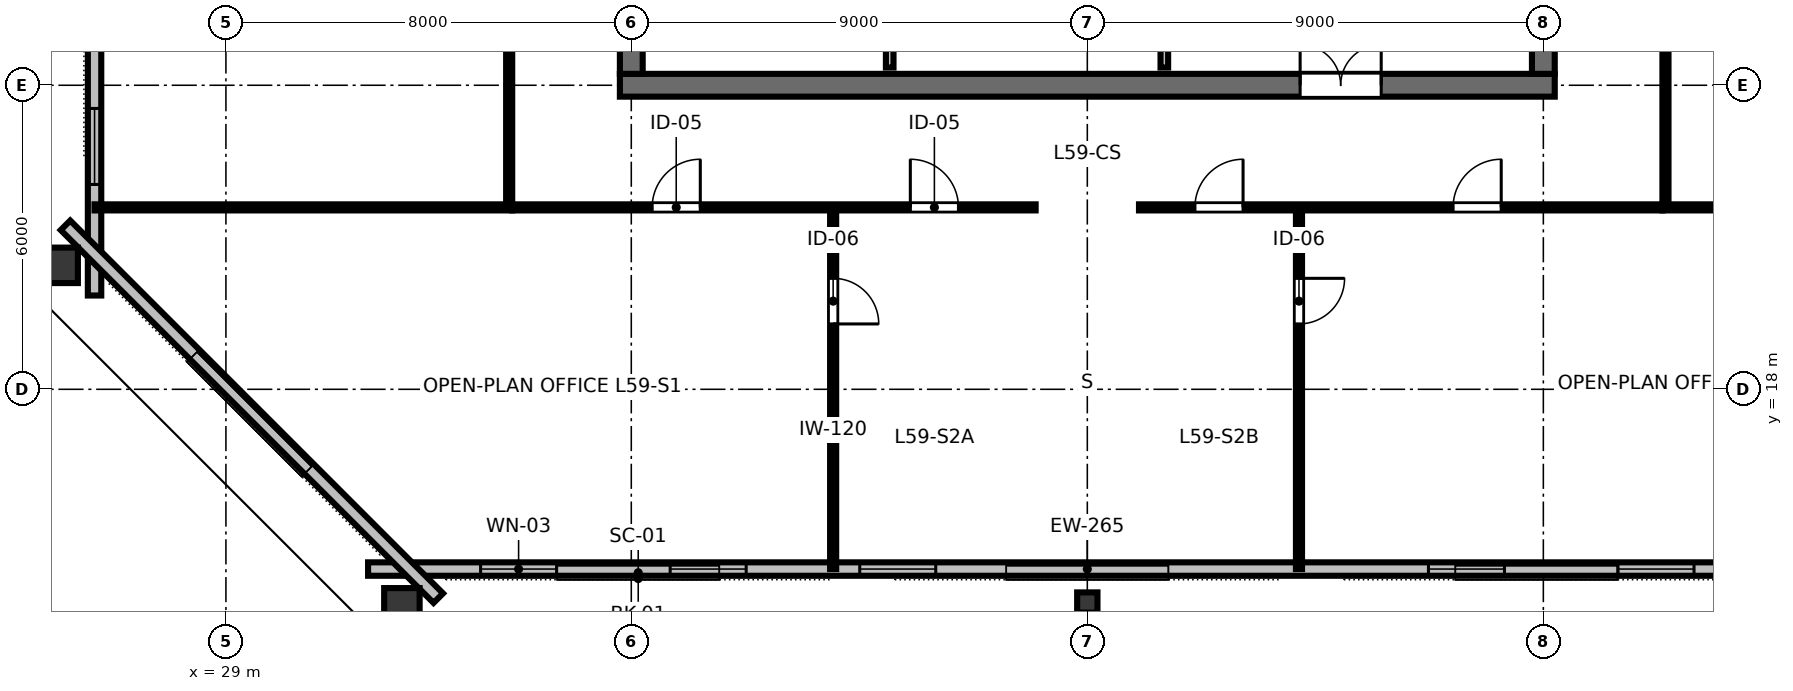
"""IFC4 building model, lengths in metres.
Left out: names, types, materials, properties, quantities, classifications, styles, units other than length and angle.
Written with IfcOpenShell. Run it as: python <this file> out.ifc"""

import sys

from ifc_helpers import new_model, si_unit, direction, frame, frame_2d, origin, origin_2d, place, context, subcontext, project, spatial, rectangle, hollow_rectangle, i_section, extrude, element, fill, save


model = new_model("IFC4")
c1 = context("Model", 3, precision=1e-05, world=origin(), true_north=direction((0.0, 1.0)))
c2 = subcontext(c1, "Body", "Model", "MODEL_VIEW")
j1 = project(units=[si_unit("LENGTHUNIT", "METRE"), si_unit("PLANEANGLEUNIT", "RADIAN")], contexts=[c1])
p1 = place(None, origin())
s1 = spatial("IfcSite", under=j1, at=p1, CompositionType="ELEMENT")
p2 = place(p1, origin())
s2 = spatial("IfcBuilding", under=s1, at=p2, CompositionType="ELEMENT")
p3 = place(p2, frame((0.0, 0.0, 223.8)))
s3 = spatial("IfcBuildingStorey", under=s2, at=p3, CompositionType="ELEMENT", Elevation=223.8)
p4 = place(p3, frame((36.775, 24.0, 0.0), z_axis=(0.0, 0.0, 1.0), x_axis=(1.0, 0.0, 0.0)))
e1 = element("IfcWall", 1, at=p4, inside=s3, PredefinedType="SHEAR", context=c2, shape_type="SweptSolid", body=[
    extrude(rectangle(XDim=18.45, YDim=0.45, at=frame_2d((9.225, 0.0))), origin(), (0.0, 0.0, 1.0), 3.36),
])
p5 = place(p4, frame((13.425, 0.0, 0.0)))
e2 = element("IfcOpeningElement", 2, at=p5, cuts=e1, PredefinedType="OPENING", context=c2, shape_type="SweptSolid", body=[
    extrude(rectangle(XDim=1.6, YDim=2.15, at=frame_2d((0.8, 1.075))), frame((0.0, 0.235, 0.0), z_axis=(0.0, -1.0, 0.0), x_axis=(1.0, 0.0, 0.0)), (0.0, 0.0, 1.0), 0.47),
])
p6 = place(p3, frame((37.0, 24.225, 0.0), z_axis=(0.0, 0.0, 1.0), x_axis=(0.0, 1.0, 0.0)))
e3 = element("IfcWall", 3, at=p6, inside=s3, PredefinedType="SHEAR", context=c2, shape_type="SweptSolid", body=[
    extrude(rectangle(XDim=15.55, YDim=0.45, at=frame_2d((7.775, 0.0))), origin(), (0.0, 0.0, 1.0), 3.36),
])
p7 = place(p6, frame((5.3, 0.0, 0.0)))
e4 = element("IfcOpeningElement", 4, at=p7, cuts=e3, PredefinedType="OPENING", context=c2, shape_type="SweptSolid", body=[
    extrude(rectangle(XDim=1.15, YDim=2.15, at=frame_2d((0.575, 1.075))), frame((0.0, 0.235, 0.0), z_axis=(0.0, -1.0, 0.0), x_axis=(1.0, 0.0, 0.0)), (0.0, 0.0, 1.0), 0.47),
])
p8 = place(p3, frame((55.0, 24.225, 0.0), z_axis=(0.0, 0.0, 1.0), x_axis=(0.0, 1.0, 0.0)))
e5 = element("IfcWall", 5, at=p8, inside=s3, PredefinedType="SHEAR", context=c2, shape_type="SweptSolid", body=[
    extrude(rectangle(XDim=15.55, YDim=0.45, at=frame_2d((7.775, 0.0))), origin(), (0.0, 0.0, 1.0), 3.36),
])
p9 = place(p8, frame((5.3, 0.0, 0.0)))
e6 = element("IfcOpeningElement", 6, at=p9, cuts=e5, PredefinedType="OPENING", context=c2, shape_type="SweptSolid", body=[
    extrude(rectangle(XDim=1.15, YDim=2.15, at=frame_2d((0.575, 1.075))), frame((0.0, 0.235, 0.0), z_axis=(0.0, -1.0, 0.0), x_axis=(1.0, 0.0, 0.0)), (0.0, 0.0, 1.0), 0.47),
])
p10 = place(p3, frame((32.473, 13.652, 0.0), z_axis=(0.0, 0.0, 1.0), x_axis=(1.0, 0.0, 0.0)))
e7 = element("IfcColumn", 7, at=p10, inside=s3, PredefinedType="COLUMN", context=c2, shape_type="SweptSolid", body=[
    extrude(hollow_rectangle(XDim=0.7, YDim=0.85, WallThickness=0.04, at=origin_2d()), origin(), (0.0, 0.0, 1.0), 3.373),
])
p11 = place(p3, frame((46.0, 13.793, 0.0), z_axis=(0.0, 0.0, 1.0), x_axis=(1.0, 0.0, 0.0)))
e8 = element("IfcColumn", 8, at=p11, inside=s3, PredefinedType="COLUMN", context=c2, shape_type="SweptSolid", body=[
    extrude(i_section(OverallWidth=0.401, OverallDepth=0.399, WebThickness=0.025, FlangeThickness=0.04, FilletRadius=0.025, at=origin_2d()), origin(), (0.0, 0.0, 1.0), 3.373),
])
p12 = place(p3, frame((25.653, 20.446, 0.0), z_axis=(0.0, 0.0, 1.0), x_axis=(0.0, 1.0, 0.0)))
e9 = element("IfcColumn", 9, at=p12, inside=s3, PredefinedType="COLUMN", context=c2, shape_type="SweptSolid", body=[
    extrude(hollow_rectangle(XDim=0.7, YDim=0.85, WallThickness=0.04, at=origin_2d()), origin(), (0.0, 0.0, 1.0), 3.373),
])
p13 = place(p3, frame((31.805, 14.453, 0.0), z_axis=(0.0, 0.0, 1.0), x_axis=(1.0, 0.0, 0.0)))
e10 = element("IfcWall", 10, at=p13, inside=s3, PredefinedType="STANDARD", context=c2, shape_type="SweptSolid", body=[
    extrude(rectangle(XDim=28.389, YDim=0.265, at=frame_2d((14.195, 0.0))), origin(), (0.0, 0.0, 1.0), 3.375),
])
p14 = place(p13, frame((2.221, 0.0, 0.85)))
e11 = element("IfcOpeningElement", 11, at=p14, cuts=e10, PredefinedType="OPENING", context=c2, shape_type="SweptSolid", body=[
    extrude(rectangle(XDim=1.5, YDim=1.85, at=frame_2d((0.75, 0.925))), frame((0.0, 0.142, 0.0), z_axis=(0.0, -1.0, 0.0), x_axis=(1.0, 0.0, 0.0)), (0.0, 0.0, 1.0), 0.285),
])
p15 = place(p13, frame((5.962, 0.0, 0.85)))
e12 = element("IfcOpeningElement", 12, at=p15, cuts=e10, PredefinedType="OPENING", context=c2, shape_type="SweptSolid", body=[
    extrude(rectangle(XDim=1.5, YDim=1.85, at=frame_2d((0.75, 0.925))), frame((0.0, 0.142, 0.0), z_axis=(0.0, -1.0, 0.0), x_axis=(1.0, 0.0, 0.0)), (0.0, 0.0, 1.0), 0.285),
])
p16 = place(p13, frame((9.703, 0.0, 0.85)))
e13 = element("IfcOpeningElement", 13, at=p16, cuts=e10, PredefinedType="OPENING", context=c2, shape_type="SweptSolid", body=[
    extrude(rectangle(XDim=1.5, YDim=1.85, at=frame_2d((0.75, 0.925))), frame((0.0, 0.142, 0.0), z_axis=(0.0, -1.0, 0.0), x_axis=(1.0, 0.0, 0.0)), (0.0, 0.0, 1.0), 0.285),
])
p17 = place(p13, frame((20.927, 0.0, 0.85)))
e14 = element("IfcOpeningElement", 14, at=p17, cuts=e10, PredefinedType="OPENING", context=c2, shape_type="SweptSolid", body=[
    extrude(rectangle(XDim=1.5, YDim=1.85, at=frame_2d((0.75, 0.925))), frame((0.0, 0.142, 0.0), z_axis=(0.0, -1.0, 0.0), x_axis=(1.0, 0.0, 0.0)), (0.0, 0.0, 1.0), 0.285),
])
p18 = place(p13, frame((24.668, 0.0, 0.85)))
e15 = element("IfcOpeningElement", 15, at=p18, cuts=e10, PredefinedType="OPENING", context=c2, shape_type="SweptSolid", body=[
    extrude(rectangle(XDim=1.5, YDim=1.85, at=frame_2d((0.75, 0.925))), frame((0.0, 0.142, 0.0), z_axis=(0.0, -1.0, 0.0), x_axis=(1.0, 0.0, 0.0)), (0.0, 0.0, 1.0), 0.285),
])
p19 = place(p3, frame((26.407, 44.149, 0.0), z_axis=(0.0, 0.0, 1.0), x_axis=(0.0, -1.0, 0.0)))
e16 = element("IfcWall", 16, at=p19, inside=s3, PredefinedType="STANDARD", context=c2, shape_type="SweptSolid", body=[
    extrude(rectangle(XDim=24.298, YDim=0.265, at=frame_2d((12.149, 0.0))), origin(), (0.0, 0.0, 1.0), 3.375),
])
p20 = place(p19, frame((8.469, 0.0, 0.0)))
e17 = element("IfcOpeningElement", 17, at=p20, cuts=e16, PredefinedType="OPENING", context=c2, shape_type="SweptSolid", body=[
    extrude(rectangle(XDim=1.4, YDim=2.15, at=frame_2d((0.7, 1.075))), frame((0.0, 0.142, 0.0), z_axis=(0.0, -1.0, 0.0), x_axis=(1.0, 0.0, 0.0)), (0.0, 0.0, 1.0), 0.285),
])
p21 = place(p19, frame((2.191, 0.0, 0.85)))
e18 = element("IfcOpeningElement", 18, at=p21, cuts=e16, PredefinedType="OPENING", context=c2, shape_type="SweptSolid", body=[
    extrude(rectangle(XDim=1.5, YDim=1.85, at=frame_2d((0.75, 0.925))), frame((0.0, 0.142, 0.0), z_axis=(0.0, -1.0, 0.0), x_axis=(1.0, 0.0, 0.0)), (0.0, 0.0, 1.0), 0.285),
])
p22 = place(p19, frame((5.875, 0.0, 0.85)))
e19 = element("IfcOpeningElement", 19, at=p22, cuts=e16, PredefinedType="OPENING", context=c2, shape_type="SweptSolid", body=[
    extrude(rectangle(XDim=1.5, YDim=1.85, at=frame_2d((0.75, 0.925))), frame((0.0, 0.142, 0.0), z_axis=(0.0, -1.0, 0.0), x_axis=(1.0, 0.0, 0.0)), (0.0, 0.0, 1.0), 0.285),
])
p23 = place(p19, frame((13.24, 0.0, 0.85)))
e20 = element("IfcOpeningElement", 20, at=p23, cuts=e16, PredefinedType="OPENING", context=c2, shape_type="SweptSolid", body=[
    extrude(rectangle(XDim=1.5, YDim=1.85, at=frame_2d((0.75, 0.925))), frame((0.0, 0.142, 0.0), z_axis=(0.0, -1.0, 0.0), x_axis=(1.0, 0.0, 0.0)), (0.0, 0.0, 1.0), 0.285),
])
p24 = place(p19, frame((16.924, 0.0, 0.85)))
e21 = element("IfcOpeningElement", 21, at=p24, cuts=e16, PredefinedType="OPENING", context=c2, shape_type="SweptSolid", body=[
    extrude(rectangle(XDim=1.5, YDim=1.85, at=frame_2d((0.75, 0.925))), frame((0.0, 0.142, 0.0), z_axis=(0.0, -1.0, 0.0), x_axis=(1.0, 0.0, 0.0)), (0.0, 0.0, 1.0), 0.285),
])
p25 = place(p19, frame((20.607, 0.0, 0.85)))
e22 = element("IfcOpeningElement", 22, at=p25, cuts=e16, PredefinedType="OPENING", context=c2, shape_type="SweptSolid", body=[
    extrude(rectangle(XDim=1.5, YDim=1.85, at=frame_2d((0.75, 0.925))), frame((0.0, 0.142, 0.0), z_axis=(0.0, -1.0, 0.0), x_axis=(1.0, 0.0, 0.0)), (0.0, 0.0, 1.0), 0.285),
])
p26 = place(p3, frame((25.833, 21.236, 0.0), z_axis=(0.0, 0.0, 1.0), x_axis=(0.707106781187, -0.707106781187, 0.0)))
e23 = element("IfcWall", 23, at=p26, inside=s3, PredefinedType="STANDARD", context=c2, shape_type="SweptSolid", body=[
    extrude(rectangle(XDim=10.405, YDim=0.265, at=frame_2d((5.203, 0.0))), origin(), (0.0, 0.0, 1.0), 3.375),
])
p27 = place(p3, frame((42.1, 24.35, 0.0), z_axis=(0.0, 0.0, 1.0), x_axis=(0.0, 1.0, 0.0)))
e24 = element("IfcWall", 24, at=p27, inside=s3, PredefinedType="PARTITIONING", context=c2, shape_type="SweptSolid", body=[
    extrude(rectangle(XDim=3.9, YDim=0.15, at=frame_2d((1.95, 0.0))), origin(), (0.0, 0.0, 1.0), 3.375),
])
p28 = place(p27, frame((1.5, 0.0, 0.0)))
e25 = element("IfcOpeningElement", 25, at=p28, cuts=e24, PredefinedType="OPENING", context=c2, shape_type="SweptSolid", body=[
    extrude(rectangle(XDim=0.9, YDim=2.15, at=frame_2d((0.45, 1.075))), frame((0.0, 0.085, 0.0), z_axis=(0.0, -1.0, 0.0), x_axis=(1.0, 0.0, 0.0)), (0.0, 0.0, 1.0), 0.17),
])
p29 = place(p3, frame((47.52, 24.35, 0.0), z_axis=(0.0, 0.0, 1.0), x_axis=(0.0, 1.0, 0.0)))
e26 = element("IfcWall", 26, at=p29, inside=s3, PredefinedType="PARTITIONING", context=c2, shape_type="SweptSolid", body=[
    extrude(rectangle(XDim=3.9, YDim=0.15, at=frame_2d((1.95, 0.0))), origin(), (0.0, 0.0, 1.0), 3.375),
])
p30 = place(p29, frame((0.35, 0.0, 0.0)))
e27 = element("IfcOpeningElement", 27, at=p30, cuts=e26, PredefinedType="OPENING", context=c2, shape_type="SweptSolid", body=[
    extrude(rectangle(XDim=0.9, YDim=2.15, at=frame_2d((0.45, 1.075))), frame((0.0, 0.085, 0.0), z_axis=(0.0, -1.0, 0.0), x_axis=(1.0, 0.0, 0.0)), (0.0, 0.0, 1.0), 0.17),
])
p31 = place(p3, frame((40.984, 21.59, 0.0), z_axis=(0.0, 0.0, 1.0), x_axis=(0.0, -1.0, 0.0)))
e28 = element("IfcWall", 28, at=p31, inside=s3, PredefinedType="PARTITIONING", context=c2, shape_type="SweptSolid", body=[
    extrude(rectangle(XDim=7.137, YDim=0.12, at=frame_2d((3.569, 0.0))), origin(), (0.0, 0.0, 1.0), 2.655),
])
p32 = place(p31, frame((1.4, 0.0, 0.0)))
e29 = element("IfcOpeningElement", 29, at=p32, cuts=e28, PredefinedType="OPENING", context=c2, shape_type="SweptSolid", body=[
    extrude(rectangle(XDim=0.9, YDim=2.15, at=frame_2d((0.45, 1.075))), frame((0.0, 0.07, 0.0), z_axis=(0.0, -1.0, 0.0), x_axis=(1.0, 0.0, 0.0)), (0.0, 0.0, 1.0), 0.14),
])
p33 = place(p3, frame((50.177, 21.59, 0.0), z_axis=(0.0, 0.0, 1.0), x_axis=(0.0, -1.0, 0.0)))
e30 = element("IfcWall", 30, at=p33, inside=s3, PredefinedType="PARTITIONING", context=c2, shape_type="SweptSolid", body=[
    extrude(rectangle(XDim=7.137, YDim=0.12, at=frame_2d((3.569, 0.0))), origin(), (0.0, 0.0, 1.0), 2.655),
])
p34 = place(p33, frame((1.4, 0.0, 0.0)))
e31 = element("IfcOpeningElement", 31, at=p34, cuts=e30, PredefinedType="OPENING", context=c2, shape_type="SweptSolid", body=[
    extrude(rectangle(XDim=0.9, YDim=2.15, at=frame_2d((0.45, 1.075))), frame((0.0, 0.07, 0.0), z_axis=(0.0, -1.0, 0.0), x_axis=(1.0, 0.0, 0.0)), (0.0, 0.0, 1.0), 0.14),
])
p35 = place(p3, frame((34.65, 21.59, 0.0), z_axis=(0.0, 0.0, 1.0), x_axis=(1.0, 0.0, 0.0)))
e32 = element("IfcWall", 32, at=p35, inside=s3, PredefinedType="PARTITIONING", context=c2, shape_type="SweptSolid", body=[
    extrude(rectangle(XDim=10.33, YDim=0.12, at=frame_2d((5.165, 0.0))), origin(), (0.0, 0.0, 1.0), 2.655),
])
p36 = place(p35, frame((2.762, 0.0, 0.0)))
e33 = element("IfcOpeningElement", 33, at=p36, cuts=e32, PredefinedType="OPENING", context=c2, shape_type="SweptSolid", body=[
    extrude(rectangle(XDim=0.95, YDim=2.15, at=frame_2d((0.475, 1.075))), frame((0.0, 0.07, 0.0), z_axis=(0.0, -1.0, 0.0), x_axis=(1.0, 0.0, 0.0)), (0.0, 0.0, 1.0), 0.14),
])
p37 = place(p35, frame((7.857, 0.0, 0.0)))
e34 = element("IfcOpeningElement", 34, at=p37, cuts=e32, PredefinedType="OPENING", context=c2, shape_type="SweptSolid", body=[
    extrude(rectangle(XDim=0.95, YDim=2.15, at=frame_2d((0.475, 1.075))), frame((0.0, 0.07, 0.0), z_axis=(0.0, -1.0, 0.0), x_axis=(1.0, 0.0, 0.0)), (0.0, 0.0, 1.0), 0.14),
])
p38 = place(p3, frame((47.02, 21.59, 0.0), z_axis=(0.0, 0.0, 1.0), x_axis=(1.0, 0.0, 0.0)))
e35 = element("IfcWall", 35, at=p38, inside=s3, PredefinedType="PARTITIONING", context=c2, shape_type="SweptSolid", body=[
    extrude(rectangle(XDim=10.33, YDim=0.12, at=frame_2d((5.165, 0.0))), origin(), (0.0, 0.0, 1.0), 2.655),
])
p39 = place(p38, frame((1.104, 0.0, 0.0)))
e36 = element("IfcOpeningElement", 36, at=p39, cuts=e35, PredefinedType="OPENING", context=c2, shape_type="SweptSolid", body=[
    extrude(rectangle(XDim=0.95, YDim=2.15, at=frame_2d((0.475, 1.075))), frame((0.0, 0.07, 0.0), z_axis=(0.0, -1.0, 0.0), x_axis=(1.0, 0.0, 0.0)), (0.0, 0.0, 1.0), 0.14),
])
p40 = place(p38, frame((6.199, 0.0, 0.0)))
e37 = element("IfcOpeningElement", 37, at=p40, cuts=e35, PredefinedType="OPENING", context=c2, shape_type="SweptSolid", body=[
    extrude(rectangle(XDim=0.95, YDim=2.15, at=frame_2d((0.475, 1.075))), frame((0.0, 0.07, 0.0), z_axis=(0.0, -1.0, 0.0), x_axis=(1.0, 0.0, 0.0)), (0.0, 0.0, 1.0), 0.14),
])
p41 = place(p3, frame((34.59, 21.65, 0.0), z_axis=(0.0, 0.0, 1.0), x_axis=(0.0, 1.0, 0.0)))
e38 = element("IfcWall", 38, at=p41, inside=s3, PredefinedType="PARTITIONING", context=c2, shape_type="SweptSolid", body=[
    extrude(rectangle(XDim=20.7, YDim=0.12, at=frame_2d((10.35, 0.0))), origin(), (0.0, 0.0, 1.0), 2.655),
])
p42 = place(p41, frame((5.449, 0.0, 0.0)))
e39 = element("IfcOpeningElement", 39, at=p42, cuts=e38, PredefinedType="OPENING", context=c2, shape_type="SweptSolid", body=[
    extrude(rectangle(XDim=0.95, YDim=2.15, at=frame_2d((0.475, 1.075))), frame((0.0, 0.07, 0.0), z_axis=(0.0, -1.0, 0.0), x_axis=(1.0, 0.0, 0.0)), (0.0, 0.0, 1.0), 0.14),
])
p43 = place(p41, frame((15.599, 0.0, 0.0)))
e40 = element("IfcOpeningElement", 40, at=p43, cuts=e38, PredefinedType="OPENING", context=c2, shape_type="SweptSolid", body=[
    extrude(rectangle(XDim=0.95, YDim=2.15, at=frame_2d((0.475, 1.075))), frame((0.0, 0.07, 0.0), z_axis=(0.0, -1.0, 0.0), x_axis=(1.0, 0.0, 0.0)), (0.0, 0.0, 1.0), 0.14),
])
p44 = place(p3, frame((57.41, 21.65, 0.0), z_axis=(0.0, 0.0, 1.0), x_axis=(0.0, 1.0, 0.0)))
e41 = element("IfcWall", 41, at=p44, inside=s3, PredefinedType="PARTITIONING", context=c2, shape_type="SweptSolid", body=[
    extrude(rectangle(XDim=20.7, YDim=0.12, at=frame_2d((10.35, 0.0))), origin(), (0.0, 0.0, 1.0), 2.655),
])
p45 = place(p44, frame((9.875, 0.0, 0.0)))
e42 = element("IfcOpeningElement", 42, at=p45, cuts=e41, PredefinedType="OPENING", context=c2, shape_type="SweptSolid", body=[
    extrude(rectangle(XDim=0.95, YDim=2.15, at=frame_2d((0.475, 1.075))), frame((0.0, 0.07, 0.0), z_axis=(0.0, -1.0, 0.0), x_axis=(1.0, 0.0, 0.0)), (0.0, 0.0, 1.0), 0.14),
])
for number, where, z_axis, x_axis in (
    (43, (34.65, 21.59, 0.0), (0.0, 0.0, 1.0), (-1.0, 0.0, 0.0)),
    (44, (57.35, 21.59, 0.0), (0.0, 0.0, 1.0), (1.0, 0.0, 0.0)),
):
    element("IfcWall", number, at=place(p3, frame(where, z_axis=z_axis, x_axis=x_axis)), inside=s3, PredefinedType="PARTITIONING", context=c2, shape_type="SweptSolid", body=[
        extrude(rectangle(XDim=8.243, YDim=0.12, at=frame_2d((4.121, 0.0))), origin(), (0.0, 0.0, 1.0), 2.655),
    ])
p46 = place(p14, origin())
e45 = element("IfcWindow", 45, at=p46, inside=s3, PartitioningType="SINGLE_PANEL", PredefinedType="WINDOW", context=c2, shape_type="SweptSolid", body=[
    extrude(rectangle(XDim=1.5, YDim=1.85, at=frame_2d((0.75, 0.925))), frame((0.0, 0.03, 0.0), z_axis=(0.0, -1.0, 0.0), x_axis=(1.0, 0.0, 0.0)), (0.0, 0.0, 1.0), 0.06),
])
fill(e11, e45)
p47 = place(p15, origin())
e46 = element("IfcWindow", 46, at=p47, inside=s3, PartitioningType="SINGLE_PANEL", PredefinedType="WINDOW", context=c2, shape_type="SweptSolid", body=[
    extrude(rectangle(XDim=1.5, YDim=1.85, at=frame_2d((0.75, 0.925))), frame((0.0, 0.03, 0.0), z_axis=(0.0, -1.0, 0.0), x_axis=(1.0, 0.0, 0.0)), (0.0, 0.0, 1.0), 0.06),
])
fill(e12, e46)
p48 = place(p16, origin())
e47 = element("IfcWindow", 47, at=p48, inside=s3, PartitioningType="SINGLE_PANEL", PredefinedType="WINDOW", context=c2, shape_type="SweptSolid", body=[
    extrude(rectangle(XDim=1.5, YDim=1.85, at=frame_2d((0.75, 0.925))), frame((0.0, 0.03, 0.0), z_axis=(0.0, -1.0, 0.0), x_axis=(1.0, 0.0, 0.0)), (0.0, 0.0, 1.0), 0.06),
])
fill(e13, e47)
p49 = place(p17, origin())
e48 = element("IfcWindow", 48, at=p49, inside=s3, PartitioningType="SINGLE_PANEL", PredefinedType="WINDOW", context=c2, shape_type="SweptSolid", body=[
    extrude(rectangle(XDim=1.5, YDim=1.85, at=frame_2d((0.75, 0.925))), frame((0.0, 0.03, 0.0), z_axis=(0.0, -1.0, 0.0), x_axis=(1.0, 0.0, 0.0)), (0.0, 0.0, 1.0), 0.06),
])
fill(e14, e48)
p50 = place(p18, origin())
e49 = element("IfcWindow", 49, at=p50, inside=s3, PartitioningType="SINGLE_PANEL", PredefinedType="WINDOW", context=c2, shape_type="SweptSolid", body=[
    extrude(rectangle(XDim=1.5, YDim=1.85, at=frame_2d((0.75, 0.925))), frame((0.0, 0.03, 0.0), z_axis=(0.0, -1.0, 0.0), x_axis=(1.0, 0.0, 0.0)), (0.0, 0.0, 1.0), 0.06),
])
fill(e15, e49)
p51 = place(p25, origin())
e50 = element("IfcWindow", 50, at=p51, inside=s3, PartitioningType="SINGLE_PANEL", PredefinedType="WINDOW", context=c2, shape_type="SweptSolid", body=[
    extrude(rectangle(XDim=1.5, YDim=1.85, at=frame_2d((0.75, 0.925))), frame((0.0, 0.03, 0.0), z_axis=(0.0, -1.0, 0.0), x_axis=(1.0, 0.0, 0.0)), (0.0, 0.0, 1.0), 0.06),
])
fill(e22, e50)
p52 = place(p5, origin())
e51 = element("IfcDoor", 51, at=p52, inside=s3, OperationType="DOUBLE_DOOR_SINGLE_SWING", PredefinedType="DOOR", context=c2, shape_type="SweptSolid", body=[
    extrude(rectangle(XDim=1.6, YDim=2.15, at=frame_2d((0.8, 1.075))), frame((0.0, 0.025, 0.0), z_axis=(0.0, -1.0, 0.0), x_axis=(1.0, 0.0, 0.0)), (0.0, 0.0, 1.0), 0.05),
])
fill(e2, e51)
p53 = place(p32, origin())
e52 = element("IfcDoor", 52, at=p53, inside=s3, OperationType="SINGLE_SWING_RIGHT", PredefinedType="DOOR", context=c2, shape_type="SweptSolid", body=[
    extrude(rectangle(XDim=0.9, YDim=2.15, at=frame_2d((0.45, 1.075))), frame((0.0, 0.025, 0.0), z_axis=(0.0, -1.0, 0.0), x_axis=(1.0, 0.0, 0.0)), (0.0, 0.0, 1.0), 0.05),
])
fill(e29, e52)
p54 = place(p34, origin())
e53 = element("IfcDoor", 53, at=p54, inside=s3, OperationType="SINGLE_SWING_LEFT", PredefinedType="DOOR", context=c2, shape_type="SweptSolid", body=[
    extrude(rectangle(XDim=0.9, YDim=2.15, at=frame_2d((0.45, 1.075))), frame((0.0, 0.025, 0.0), z_axis=(0.0, -1.0, 0.0), x_axis=(1.0, 0.0, 0.0)), (0.0, 0.0, 1.0), 0.05),
])
fill(e31, e53)
p55 = place(p36, origin())
e54 = element("IfcDoor", 54, at=p55, inside=s3, OperationType="SINGLE_SWING_RIGHT", PredefinedType="DOOR", context=c2, shape_type="SweptSolid", body=[
    extrude(rectangle(XDim=0.95, YDim=2.15, at=frame_2d((0.475, 1.075))), frame((0.0, 0.025, 0.0), z_axis=(0.0, -1.0, 0.0), x_axis=(1.0, 0.0, 0.0)), (0.0, 0.0, 1.0), 0.05),
])
fill(e33, e54)
p56 = place(p37, origin())
e55 = element("IfcDoor", 55, at=p56, inside=s3, OperationType="SINGLE_SWING_LEFT", PredefinedType="DOOR", context=c2, shape_type="SweptSolid", body=[
    extrude(rectangle(XDim=0.95, YDim=2.15, at=frame_2d((0.475, 1.075))), frame((0.0, 0.025, 0.0), z_axis=(0.0, -1.0, 0.0), x_axis=(1.0, 0.0, 0.0)), (0.0, 0.0, 1.0), 0.05),
])
fill(e34, e55)
p57 = place(p39, origin())
e56 = element("IfcDoor", 56, at=p57, inside=s3, OperationType="SINGLE_SWING_RIGHT", PredefinedType="DOOR", context=c2, shape_type="SweptSolid", body=[
    extrude(rectangle(XDim=0.95, YDim=2.15, at=frame_2d((0.475, 1.075))), frame((0.0, 0.025, 0.0), z_axis=(0.0, -1.0, 0.0), x_axis=(1.0, 0.0, 0.0)), (0.0, 0.0, 1.0), 0.05),
])
fill(e36, e56)
p58 = place(p40, origin())
e57 = element("IfcDoor", 57, at=p58, inside=s3, OperationType="SINGLE_SWING_RIGHT", PredefinedType="DOOR", context=c2, shape_type="SweptSolid", body=[
    extrude(rectangle(XDim=0.95, YDim=2.15, at=frame_2d((0.475, 1.075))), frame((0.0, 0.025, 0.0), z_axis=(0.0, -1.0, 0.0), x_axis=(1.0, 0.0, 0.0)), (0.0, 0.0, 1.0), 0.05),
])
fill(e37, e57)
save(model, sys.argv[1])
